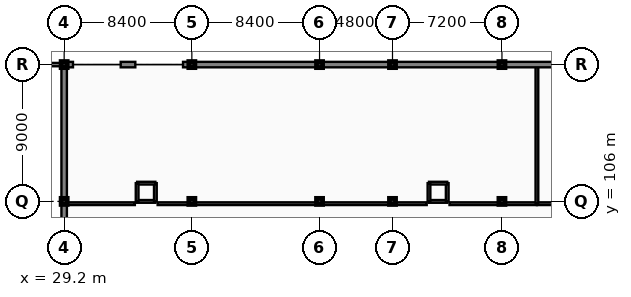
"""IFC4 building model, lengths in metres.
Left out: names, types, materials, properties, quantities, classifications, styles, units other than length and angle.
Written with IfcOpenShell. Run it as: python <this file> out.ifc"""

import sys

from ifc_helpers import new_model, si_unit, direction, frame, frame_2d, origin, origin_2d, place, context, subcontext, project, spatial, rectangle, extrude, element, fill, save


model = new_model("IFC4")
c1 = context("Model", 3, precision=1e-05, world=origin(), true_north=direction((0.0, 1.0)))
c2 = subcontext(c1, "Body", "Model", "MODEL_VIEW")
j1 = project(units=[si_unit("LENGTHUNIT", "METRE"), si_unit("PLANEANGLEUNIT", "RADIAN")], contexts=[c1])
p1 = place(None, origin())
s1 = spatial("IfcSite", under=j1, at=p1, CompositionType="ELEMENT")
p2 = place(p1, origin())
s2 = spatial("IfcBuilding", under=s1, at=p2, CompositionType="ELEMENT")
p3 = place(p2, frame((0.0, 0.0, 13.8)))
s3 = spatial("IfcBuildingStorey", under=s2, at=p3, CompositionType="ELEMENT", Elevation=13.8)
for number, where, z_axis, x_axis in (
    (1, (29.2, 106.0, 0.0), (0.0, 0.0, 1.0), (1.0, 0.0, 0.0)),
    (2, (29.2, 115.0, 0.0), (0.0, 0.0, 1.0), (1.0, 0.0, 0.0)),
    (3, (37.6, 106.0, 0.0), (0.0, 0.0, 1.0), (1.0, 0.0, 0.0)),
    (4, (37.6, 115.0, 0.0), (0.0, 0.0, 1.0), (1.0, 0.0, 0.0)),
    (5, (46.0, 106.0, 0.0), (0.0, 0.0, 1.0), (1.0, 0.0, 0.0)),
    (6, (46.0, 115.0, 0.0), (0.0, 0.0, 1.0), (1.0, 0.0, 0.0)),
    (7, (50.8, 106.0, 0.0), (0.0, 0.0, 1.0), (1.0, 0.0, 0.0)),
    (8, (50.8, 115.0, 0.0), (0.0, 0.0, 1.0), (1.0, 0.0, 0.0)),
    (9, (58.0, 106.0, 0.0), (0.0, 0.0, 1.0), (1.0, 0.0, 0.0)),
    (10, (58.0, 115.0, 0.0), (0.0, 0.0, 1.0), (1.0, 0.0, 0.0)),
):
    element("IfcColumn", number, at=place(p3, frame(where, z_axis=z_axis, x_axis=x_axis)), inside=s3, PredefinedType="COLUMN", context=c2, shape_type="SweptSolid", body=[
        extrude(rectangle(XDim=0.4, YDim=0.4, at=origin_2d()), origin(), (0.0, 0.0, 1.0), 3.9),
    ])
p4 = place(p3, frame((29.34, 105.85, 0.0), z_axis=(0.0, 0.0, 1.0), x_axis=(1.0, 0.0, 0.0)))
e11 = element("IfcWall", 11, at=p4, inside=s3, PredefinedType="PARTITIONING", context=c2, shape_type="SweptSolid", body=[
    extrude(rectangle(XDim=4.51, YDim=0.18, at=frame_2d((2.255, 0.0))), origin(), (0.0, 0.0, 1.0), 3.09),
])
p5 = place(p4, frame((1.31, 0.0, -0.01)))
e12 = element("IfcOpeningElement", 12, at=p5, cuts=e11, PredefinedType="OPENING", context=c2, shape_type="SweptSolid", body=[
    extrude(rectangle(XDim=1.6, YDim=2.21, at=frame_2d((0.8, 1.105))), frame((0.0, 0.1, 0.0), z_axis=(0.0, -1.0, 0.0), x_axis=(1.0, 0.0, 0.0)), (0.0, 0.0, 1.0), 0.2),
])
p6 = place(p3, frame((35.35, 105.85, 0.0), z_axis=(0.0, 0.0, 1.0), x_axis=(1.0, 0.0, 0.0)))
e13 = element("IfcWall", 13, at=p6, inside=s3, PredefinedType="PARTITIONING", context=c2, shape_type="SweptSolid", body=[
    extrude(rectangle(XDim=17.7, YDim=0.18, at=frame_2d((8.85, 0.0))), origin(), (0.0, 0.0, 1.0), 3.15),
])
p7 = place(p3, frame((54.55, 105.85, 0.0), z_axis=(0.0, 0.0, 1.0), x_axis=(1.0, 0.0, 0.0)))
e14 = element("IfcWall", 14, at=p7, inside=s3, PredefinedType="PARTITIONING", context=c2, shape_type="SweptSolid", body=[
    extrude(rectangle(XDim=5.75, YDim=0.18, at=frame_2d((2.875, 0.0))), origin(), (0.0, 0.0, 1.0), 3.15),
])
p8 = place(p3, frame((60.3, 105.85, 0.0), z_axis=(0.0, 0.0, 1.0), x_axis=(1.0, 0.0, 0.0)))
e15 = element("IfcWall", 15, at=p8, inside=s3, PredefinedType="PARTITIONING", context=c2, shape_type="SweptSolid", body=[
    extrude(rectangle(XDim=15.1, YDim=0.18, at=frame_2d((7.55, 0.0))), origin(), (0.0, 0.0, 1.0), 3.15),
])
p9 = place(p8, frame((7.05, 0.0, -0.01)))
e16 = element("IfcOpeningElement", 16, at=p9, cuts=e15, PredefinedType="OPENING", context=c2, shape_type="SweptSolid", body=[
    extrude(rectangle(XDim=1.0, YDim=2.16, at=frame_2d((0.5, 1.08))), frame((0.0, 0.1, 0.0), z_axis=(0.0, -1.0, 0.0), x_axis=(1.0, 0.0, 0.0)), (0.0, 0.0, 1.0), 0.2),
])
p10 = place(p3, frame((60.3, 105.85, 0.0), z_axis=(0.0, 0.0, 1.0), x_axis=(0.0, 1.0, 0.0)))
e17 = element("IfcWall", 17, at=p10, inside=s3, PredefinedType="PARTITIONING", context=c2, shape_type="SweptSolid", body=[
    extrude(rectangle(XDim=9.01, YDim=0.18, at=frame_2d((4.505, 0.0))), origin(), (0.0, 0.0, 1.0), 3.18),
])
p11 = place(p3, frame((33.88, 115.0, 0.0), z_axis=(0.0, 0.0, 1.0), x_axis=(-1.0, 0.0, 0.0)))
e18 = element("IfcWall", 18, at=p11, inside=s3, PredefinedType="SOLIDWALL", context=c2, shape_type="SweptSolid", body=[
    extrude(rectangle(XDim=0.96, YDim=0.36, at=frame_2d((0.48, 0.0))), origin(), (0.0, 0.0, 1.0), 3.01),
])
for number, where, z_axis, x_axis in (
    (19, (37.47, 115.0, 0.0), (0.0, 0.0, 1.0), (-1.0, 0.0, 0.0)),
    (20, (29.78, 115.0, 0.0), (0.0, 0.0, 1.0), (-1.0, 0.0, 0.0)),
):
    element("IfcWall", number, at=place(p3, frame(where, z_axis=z_axis, x_axis=x_axis)), inside=s3, PredefinedType="SOLIDWALL", context=c2, shape_type="SweptSolid", body=[
        extrude(rectangle(XDim=0.45, YDim=0.36, at=frame_2d((0.225, 0.0))), origin(), (0.0, 0.0, 1.0), 3.01),
    ])
p12 = place(p3, frame((46.0, 115.0, 0.0), z_axis=(0.0, 0.0, 1.0), x_axis=(-1.0, 0.0, 0.0)))
e21 = element("IfcWall", 21, at=p12, inside=s3, PredefinedType="SOLIDWALL", context=c2, shape_type="SweptSolid", body=[
    extrude(rectangle(XDim=8.4, YDim=0.36, at=frame_2d((4.2, 0.0))), origin(), (0.0, 0.0, 1.0), 3.01),
])
p13 = place(p12, frame((0.46, 0.0, 0.75)))
e22 = element("IfcOpeningElement", 22, at=p13, cuts=e21, PredefinedType="OPENING", context=c2, shape_type="SweptSolid", body=[
    extrude(rectangle(XDim=1.55, YDim=2.12, at=frame_2d((0.775, 1.06))), frame((0.0, 0.19, 0.0), z_axis=(0.0, -1.0, 0.0), x_axis=(1.0, 0.0, 0.0)), (0.0, 0.0, 1.0), 0.38),
])
p14 = place(p12, frame((6.26, 0.0, 0.75)))
e23 = element("IfcOpeningElement", 23, at=p14, cuts=e21, PredefinedType="OPENING", context=c2, shape_type="SweptSolid", body=[
    extrude(rectangle(XDim=1.55, YDim=2.12, at=frame_2d((0.775, 1.06))), frame((0.0, 0.19, 0.0), z_axis=(0.0, -1.0, 0.0), x_axis=(1.0, 0.0, 0.0)), (0.0, 0.0, 1.0), 0.38),
])
p15 = place(p3, frame((50.8, 115.0, 0.0), z_axis=(0.0, 0.0, 1.0), x_axis=(-1.0, 0.0, 0.0)))
e24 = element("IfcWall", 24, at=p15, inside=s3, PredefinedType="SOLIDWALL", context=c2, shape_type="SweptSolid", body=[
    extrude(rectangle(XDim=4.8, YDim=0.36, at=frame_2d((2.4, 0.0))), origin(), (0.0, 0.0, 1.0), 3.15),
])
p16 = place(p15, frame((0.46, 0.0, 0.75)))
e25 = element("IfcOpeningElement", 25, at=p16, cuts=e24, PredefinedType="OPENING", context=c2, shape_type="SweptSolid", body=[
    extrude(rectangle(XDim=1.55, YDim=2.26, at=frame_2d((0.775, 1.13))), frame((0.0, 0.19, 0.0), z_axis=(0.0, -1.0, 0.0), x_axis=(1.0, 0.0, 0.0)), (0.0, 0.0, 1.0), 0.38),
])
p17 = place(p15, frame((2.66, 0.0, 0.75)))
e26 = element("IfcOpeningElement", 26, at=p17, cuts=e24, PredefinedType="OPENING", context=c2, shape_type="SweptSolid", body=[
    extrude(rectangle(XDim=1.55, YDim=2.26, at=frame_2d((0.775, 1.13))), frame((0.0, 0.19, 0.0), z_axis=(0.0, -1.0, 0.0), x_axis=(1.0, 0.0, 0.0)), (0.0, 0.0, 1.0), 0.38),
])
p18 = place(p3, frame((58.0, 115.0, 0.0), z_axis=(0.0, 0.0, 1.0), x_axis=(-1.0, 0.0, 0.0)))
e27 = element("IfcWall", 27, at=p18, inside=s3, PredefinedType="SOLIDWALL", context=c2, shape_type="SweptSolid", body=[
    extrude(rectangle(XDim=7.2, YDim=0.36, at=frame_2d((3.6, 0.0))), origin(), (0.0, 0.0, 1.0), 3.15),
])
p19 = place(p18, frame((0.46, 0.0, 0.75)))
e28 = element("IfcOpeningElement", 28, at=p19, cuts=e27, PredefinedType="OPENING", context=c2, shape_type="SweptSolid", body=[
    extrude(rectangle(XDim=1.55, YDim=2.26, at=frame_2d((0.775, 1.13))), frame((0.0, 0.19, 0.0), z_axis=(0.0, -1.0, 0.0), x_axis=(1.0, 0.0, 0.0)), (0.0, 0.0, 1.0), 0.38),
])
p20 = place(p18, frame((5.06, 0.0, 0.75)))
e29 = element("IfcOpeningElement", 29, at=p20, cuts=e27, PredefinedType="OPENING", context=c2, shape_type="SweptSolid", body=[
    extrude(rectangle(XDim=1.55, YDim=2.26, at=frame_2d((0.775, 1.13))), frame((0.0, 0.19, 0.0), z_axis=(0.0, -1.0, 0.0), x_axis=(1.0, 0.0, 0.0)), (0.0, 0.0, 1.0), 0.38),
])
p21 = place(p3, frame((65.2, 115.0, 0.0), z_axis=(0.0, 0.0, 1.0), x_axis=(-1.0, 0.0, 0.0)))
e30 = element("IfcWall", 30, at=p21, inside=s3, PredefinedType="SOLIDWALL", context=c2, shape_type="SweptSolid", body=[
    extrude(rectangle(XDim=7.2, YDim=0.36, at=frame_2d((3.6, 0.0))), origin(), (0.0, 0.0, 1.0), 3.15),
])
p22 = place(p21, frame((0.46, 0.0, 0.75)))
e31 = element("IfcOpeningElement", 31, at=p22, cuts=e30, PredefinedType="OPENING", context=c2, shape_type="SweptSolid", body=[
    extrude(rectangle(XDim=1.55, YDim=2.26, at=frame_2d((0.775, 1.13))), frame((0.0, 0.19, 0.0), z_axis=(0.0, -1.0, 0.0), x_axis=(1.0, 0.0, 0.0)), (0.0, 0.0, 1.0), 0.38),
])
p23 = place(p21, frame((3.06, 0.0, 0.75)))
e32 = element("IfcOpeningElement", 32, at=p23, cuts=e30, PredefinedType="OPENING", context=c2, shape_type="SweptSolid", body=[
    extrude(rectangle(XDim=1.55, YDim=2.26, at=frame_2d((0.775, 1.13))), frame((0.0, 0.19, 0.0), z_axis=(0.0, -1.0, 0.0), x_axis=(1.0, 0.0, 0.0)), (0.0, 0.0, 1.0), 0.38),
])
p24 = place(p3, frame((29.2, 106.0, 0.0), z_axis=(0.0, 0.0, 1.0), x_axis=(0.0, -1.0, 0.0)))
e33 = element("IfcWall", 33, at=p24, inside=s3, PredefinedType="SOLIDWALL", context=c2, shape_type="SweptSolid", body=[
    extrude(rectangle(XDim=8.4, YDim=0.36, at=frame_2d((4.2, 0.0))), origin(), (0.0, 0.0, 1.0), 3.01),
])
p25 = place(p24, frame((0.46, 0.0, 0.75)))
e34 = element("IfcOpeningElement", 34, at=p25, cuts=e33, PredefinedType="OPENING", context=c2, shape_type="SweptSolid", body=[
    extrude(rectangle(XDim=1.55, YDim=2.12, at=frame_2d((0.775, 1.06))), frame((0.0, 0.19, 0.0), z_axis=(0.0, -1.0, 0.0), x_axis=(1.0, 0.0, 0.0)), (0.0, 0.0, 1.0), 0.38),
])
p26 = place(p24, frame((6.26, 0.0, 0.75)))
e35 = element("IfcOpeningElement", 35, at=p26, cuts=e33, PredefinedType="OPENING", context=c2, shape_type="SweptSolid", body=[
    extrude(rectangle(XDim=1.55, YDim=2.12, at=frame_2d((0.775, 1.06))), frame((0.0, 0.19, 0.0), z_axis=(0.0, -1.0, 0.0), x_axis=(1.0, 0.0, 0.0)), (0.0, 0.0, 1.0), 0.38),
])
p27 = place(p3, frame((29.2, 115.0, 0.0), z_axis=(0.0, 0.0, 1.0), x_axis=(0.0, -1.0, 0.0)))
e36 = element("IfcWall", 36, at=p27, inside=s3, PredefinedType="SOLIDWALL", context=c2, shape_type="SweptSolid", body=[
    extrude(rectangle(XDim=9.0, YDim=0.36, at=frame_2d((4.5, 0.0))), origin(), (0.0, 0.0, 1.0), 3.01),
])
p28 = place(p27, frame((0.46, 0.0, 0.75)))
e37 = element("IfcOpeningElement", 37, at=p28, cuts=e36, PredefinedType="OPENING", context=c2, shape_type="SweptSolid", body=[
    extrude(rectangle(XDim=1.55, YDim=2.12, at=frame_2d((0.775, 1.06))), frame((0.0, 0.19, 0.0), z_axis=(0.0, -1.0, 0.0), x_axis=(1.0, 0.0, 0.0)), (0.0, 0.0, 1.0), 0.38),
])
p29 = place(p27, frame((6.86, 0.0, 0.75)))
e38 = element("IfcOpeningElement", 38, at=p29, cuts=e36, PredefinedType="OPENING", context=c2, shape_type="SweptSolid", body=[
    extrude(rectangle(XDim=1.55, YDim=2.12, at=frame_2d((0.775, 1.06))), frame((0.0, 0.19, 0.0), z_axis=(0.0, -1.0, 0.0), x_axis=(1.0, 0.0, 0.0)), (0.0, 0.0, 1.0), 0.38),
])
p30 = place(p3, frame((12.4, 115.0, 0.0), z_axis=(0.0, 0.0, 1.0), x_axis=(1.0, 0.0, 0.0)))
e39 = element("IfcWall", 39, at=p30, inside=s3, PredefinedType="PARAPET", context=c2, shape_type="SweptSolid", body=[
    extrude(rectangle(XDim=16.8, YDim=0.22, at=frame_2d((8.4, 0.0))), origin(), (0.0, 0.0, 1.0), 1.25),
])
p31 = place(p3, frame((34.0, 106.0, 0.0), z_axis=(0.0, 0.0, 1.0), x_axis=(1.0, 0.0, 0.0)))
e40 = element("IfcWall", 40, at=p31, inside=s3, PredefinedType="SOLIDWALL", context=c2, shape_type="SweptSolid", body=[
    extrude(rectangle(XDim=1.2, YDim=0.18, at=frame_2d((0.6, 0.0))), origin(), (0.0, 0.0, 1.0), 3.69),
])
p32 = place(p31, frame((0.2, 0.0, -0.01)))
e41 = element("IfcOpeningElement", 41, at=p32, cuts=e40, PredefinedType="OPENING", context=c2, shape_type="SweptSolid", body=[
    extrude(rectangle(XDim=0.8, YDim=2.06, at=frame_2d((0.4, 1.03))), frame((0.0, 0.1, 0.0), z_axis=(0.0, -1.0, 0.0), x_axis=(1.0, 0.0, 0.0)), (0.0, 0.0, 1.0), 0.2),
])
for number, where, z_axis, x_axis in (
    (42, (35.2, 106.0, 0.0), (0.0, 0.0, 1.0), (0.0, 1.0, 0.0)),
    (43, (35.2, 107.2, 0.0), (0.0, 0.0, 1.0), (-1.0, 0.0, 0.0)),
    (44, (34.0, 107.2, 0.0), (0.0, 0.0, 1.0), (0.0, -1.0, 0.0)),
):
    element("IfcWall", number, at=place(p3, frame(where, z_axis=z_axis, x_axis=x_axis)), inside=s3, PredefinedType="SOLIDWALL", context=c2, shape_type="SweptSolid", body=[
        extrude(rectangle(XDim=1.2, YDim=0.18, at=frame_2d((0.6, 0.0))), origin(), (0.0, 0.0, 1.0), 3.69),
    ])
p33 = place(p3, frame((53.2, 106.0, 0.0), z_axis=(0.0, 0.0, 1.0), x_axis=(1.0, 0.0, 0.0)))
e45 = element("IfcWall", 45, at=p33, inside=s3, PredefinedType="SOLIDWALL", context=c2, shape_type="SweptSolid", body=[
    extrude(rectangle(XDim=1.2, YDim=0.18, at=frame_2d((0.6, 0.0))), origin(), (0.0, 0.0, 1.0), 3.69),
])
p34 = place(p33, frame((0.2, 0.0, -0.01)))
e46 = element("IfcOpeningElement", 46, at=p34, cuts=e45, PredefinedType="OPENING", context=c2, shape_type="SweptSolid", body=[
    extrude(rectangle(XDim=0.8, YDim=2.06, at=frame_2d((0.4, 1.03))), frame((0.0, 0.1, 0.0), z_axis=(0.0, -1.0, 0.0), x_axis=(1.0, 0.0, 0.0)), (0.0, 0.0, 1.0), 0.2),
])
for number, where, z_axis, x_axis in (
    (47, (54.4, 106.0, 0.0), (0.0, 0.0, 1.0), (0.0, 1.0, 0.0)),
    (48, (54.4, 107.2, 0.0), (0.0, 0.0, 1.0), (-1.0, 0.0, 0.0)),
    (49, (53.2, 107.2, 0.0), (0.0, 0.0, 1.0), (0.0, -1.0, 0.0)),
):
    element("IfcWall", number, at=place(p3, frame(where, z_axis=z_axis, x_axis=x_axis)), inside=s3, PredefinedType="SOLIDWALL", context=c2, shape_type="SweptSolid", body=[
        extrude(rectangle(XDim=1.2, YDim=0.18, at=frame_2d((0.6, 0.0))), origin(), (0.0, 0.0, 1.0), 3.69),
    ])
p35 = place(p5, frame((1.6, 0.0, 0.01), z_axis=(0.0, 0.0, 1.0), x_axis=(-1.0, 0.0, 0.0)))
e50 = element("IfcDoor", 50, at=p35, inside=s3, OperationType="DOUBLE_SWING_LEFT", PredefinedType="DOOR", context=c2, shape_type="SweptSolid", body=[
    extrude(rectangle(XDim=1.6, YDim=2.2, at=frame_2d((0.8, 1.1))), frame((0.0, 0.025, 0.0), z_axis=(0.0, -1.0, 0.0), x_axis=(1.0, 0.0, 0.0)), (0.0, 0.0, 1.0), 0.05),
])
fill(e12, e50)
p36 = place(p13, origin())
e51 = element("IfcWindow", 51, at=p36, inside=s3, PartitioningType="DOUBLE_PANEL_HORIZONTAL", PredefinedType="WINDOW", context=c2, shape_type="SweptSolid", body=[
    extrude(rectangle(XDim=1.55, YDim=2.12, at=frame_2d((0.775, 1.06))), frame((0.0, 0.03, 0.0), z_axis=(0.0, -1.0, 0.0), x_axis=(1.0, 0.0, 0.0)), (0.0, 0.0, 1.0), 0.06),
])
fill(e22, e51)
p37 = place(p14, origin())
e52 = element("IfcWindow", 52, at=p37, inside=s3, PartitioningType="DOUBLE_PANEL_HORIZONTAL", PredefinedType="WINDOW", context=c2, shape_type="SweptSolid", body=[
    extrude(rectangle(XDim=1.55, YDim=2.12, at=frame_2d((0.775, 1.06))), frame((0.0, 0.03, 0.0), z_axis=(0.0, -1.0, 0.0), x_axis=(1.0, 0.0, 0.0)), (0.0, 0.0, 1.0), 0.06),
])
fill(e23, e52)
p38 = place(p16, origin())
e53 = element("IfcWindow", 53, at=p38, inside=s3, PartitioningType="DOUBLE_PANEL_HORIZONTAL", PredefinedType="WINDOW", context=c2, shape_type="SweptSolid", body=[
    extrude(rectangle(XDim=1.55, YDim=2.26, at=frame_2d((0.775, 1.13))), frame((0.0, 0.03, 0.0), z_axis=(0.0, -1.0, 0.0), x_axis=(1.0, 0.0, 0.0)), (0.0, 0.0, 1.0), 0.06),
])
fill(e25, e53)
p39 = place(p17, origin())
e54 = element("IfcWindow", 54, at=p39, inside=s3, PartitioningType="DOUBLE_PANEL_HORIZONTAL", PredefinedType="WINDOW", context=c2, shape_type="SweptSolid", body=[
    extrude(rectangle(XDim=1.55, YDim=2.26, at=frame_2d((0.775, 1.13))), frame((0.0, 0.03, 0.0), z_axis=(0.0, -1.0, 0.0), x_axis=(1.0, 0.0, 0.0)), (0.0, 0.0, 1.0), 0.06),
])
fill(e26, e54)
p40 = place(p19, origin())
e55 = element("IfcWindow", 55, at=p40, inside=s3, PartitioningType="DOUBLE_PANEL_HORIZONTAL", PredefinedType="WINDOW", context=c2, shape_type="SweptSolid", body=[
    extrude(rectangle(XDim=1.55, YDim=2.26, at=frame_2d((0.775, 1.13))), frame((0.0, 0.03, 0.0), z_axis=(0.0, -1.0, 0.0), x_axis=(1.0, 0.0, 0.0)), (0.0, 0.0, 1.0), 0.06),
])
fill(e28, e55)
p41 = place(p20, origin())
e56 = element("IfcWindow", 56, at=p41, inside=s3, PartitioningType="DOUBLE_PANEL_HORIZONTAL", PredefinedType="WINDOW", context=c2, shape_type="SweptSolid", body=[
    extrude(rectangle(XDim=1.55, YDim=2.26, at=frame_2d((0.775, 1.13))), frame((0.0, 0.03, 0.0), z_axis=(0.0, -1.0, 0.0), x_axis=(1.0, 0.0, 0.0)), (0.0, 0.0, 1.0), 0.06),
])
fill(e29, e56)
p42 = place(p23, origin())
e57 = element("IfcWindow", 57, at=p42, inside=s3, PartitioningType="DOUBLE_PANEL_HORIZONTAL", PredefinedType="WINDOW", context=c2, shape_type="SweptSolid", body=[
    extrude(rectangle(XDim=1.55, YDim=2.26, at=frame_2d((0.775, 1.13))), frame((0.0, 0.03, 0.0), z_axis=(0.0, -1.0, 0.0), x_axis=(1.0, 0.0, 0.0)), (0.0, 0.0, 1.0), 0.06),
])
fill(e32, e57)
p43 = place(p25, origin())
e58 = element("IfcWindow", 58, at=p43, inside=s3, PartitioningType="DOUBLE_PANEL_HORIZONTAL", PredefinedType="WINDOW", context=c2, shape_type="SweptSolid", body=[
    extrude(rectangle(XDim=1.55, YDim=2.12, at=frame_2d((0.775, 1.06))), frame((0.0, 0.03, 0.0), z_axis=(0.0, -1.0, 0.0), x_axis=(1.0, 0.0, 0.0)), (0.0, 0.0, 1.0), 0.06),
])
fill(e34, e58)
p44 = place(p28, origin())
e59 = element("IfcWindow", 59, at=p44, inside=s3, PartitioningType="DOUBLE_PANEL_HORIZONTAL", PredefinedType="WINDOW", context=c2, shape_type="SweptSolid", body=[
    extrude(rectangle(XDim=1.55, YDim=2.12, at=frame_2d((0.775, 1.06))), frame((0.0, 0.03, 0.0), z_axis=(0.0, -1.0, 0.0), x_axis=(1.0, 0.0, 0.0)), (0.0, 0.0, 1.0), 0.06),
])
fill(e37, e59)
p45 = place(p29, origin())
e60 = element("IfcWindow", 60, at=p45, inside=s3, PartitioningType="DOUBLE_PANEL_HORIZONTAL", PredefinedType="WINDOW", context=c2, shape_type="SweptSolid", body=[
    extrude(rectangle(XDim=1.55, YDim=2.12, at=frame_2d((0.775, 1.06))), frame((0.0, 0.03, 0.0), z_axis=(0.0, -1.0, 0.0), x_axis=(1.0, 0.0, 0.0)), (0.0, 0.0, 1.0), 0.06),
])
fill(e38, e60)
p46 = place(p32, frame((0.0, 0.0, 0.01)))
e61 = element("IfcDoor", 61, at=p46, inside=s3, OperationType="SINGLE_SWING_LEFT", PredefinedType="DOOR", context=c2, shape_type="SweptSolid", body=[
    extrude(rectangle(XDim=0.8, YDim=2.05, at=frame_2d((0.4, 1.025))), frame((0.0, 0.025, 0.0), z_axis=(0.0, -1.0, 0.0), x_axis=(1.0, 0.0, 0.0)), (0.0, 0.0, 1.0), 0.05),
])
fill(e41, e61)
p47 = place(p34, frame((0.0, 0.0, 0.01)))
e62 = element("IfcDoor", 62, at=p47, inside=s3, OperationType="SINGLE_SWING_RIGHT", PredefinedType="DOOR", context=c2, shape_type="SweptSolid", body=[
    extrude(rectangle(XDim=0.8, YDim=2.05, at=frame_2d((0.4, 1.025))), frame((0.0, 0.025, 0.0), z_axis=(0.0, -1.0, 0.0), x_axis=(1.0, 0.0, 0.0)), (0.0, 0.0, 1.0), 0.05),
])
fill(e46, e62)
save(model, sys.argv[1])
